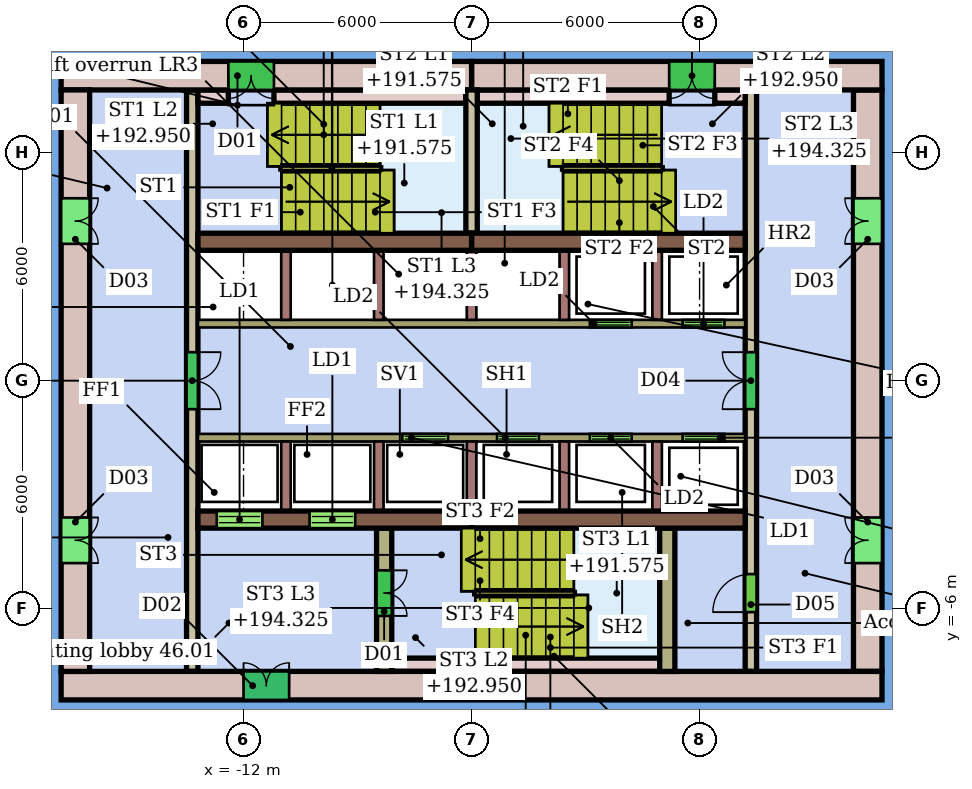
"""IFC4 building model, lengths in metres.
Left out: names, types, materials, properties, quantities, classifications, styles, units other than length and angle.
Written with IfcOpenShell. Run it as: python <this file> out.ifc"""

import sys

from ifc_helpers import new_model, si_unit, direction, frame, frame_2d, origin, place, context, subcontext, project, spatial, rectangle, extrude, element, fill, save


model = new_model("IFC4")
c1 = context("Model", 3, precision=1e-05, world=origin(), true_north=direction((0.0, 1.0)))
c2 = subcontext(c1, "Body", "Model", "MODEL_VIEW")
j1 = project(units=[si_unit("LENGTHUNIT", "METRE"), si_unit("PLANEANGLEUNIT", "RADIAN")], contexts=[c1])
p1 = place(None, origin())
s1 = spatial("IfcSite", under=j1, at=p1, CompositionType="ELEMENT")
p2 = place(p1, origin())
s2 = spatial("IfcBuilding", under=s1, at=p2, CompositionType="ELEMENT")
p3 = place(p2, frame((0.0, 0.0, 190.2)))
s3 = spatial("IfcBuildingStorey", under=s2, at=p3, CompositionType="ELEMENT", Elevation=190.2)
p4 = place(p3, frame((4.8, 8.025, 0.0), z_axis=(0.0, 0.0, 1.0), x_axis=(-1.0, 0.0, 0.0)))
e1 = element("IfcWall", 1, at=p4, inside=s3, PredefinedType="SHEAR", context=c2, shape_type="SweptSolid", body=[
    extrude(rectangle(XDim=10.8, YDim=0.75, at=frame_2d((5.4, 0.0))), origin(), (0.0, 0.0, 1.0), 5.2),
])
p5 = place(p4, frame((4.4, 0.0, 0.0)))
e2 = element("IfcOpeningElement", 2, at=p5, cuts=e1, PredefinedType="OPENING", context=c2, shape_type="SweptSolid", body=[
    extrude(rectangle(XDim=1.2, YDim=2.1, at=frame_2d((0.6, 1.05))), frame((0.0, 0.385, 0.0), z_axis=(0.0, -1.0, 0.0), x_axis=(1.0, 0.0, 0.0)), (0.0, 0.0, 1.0), 0.77),
])
p6 = place(p3, frame((-6.0, 8.025, 0.0), z_axis=(0.0, 0.0, 1.0), x_axis=(-1.0, 0.0, 0.0)))
e3 = element("IfcWall", 3, at=p6, inside=s3, PredefinedType="SHEAR", context=c2, shape_type="SweptSolid", body=[
    extrude(rectangle(XDim=10.8, YDim=0.75, at=frame_2d((5.4, 0.0))), origin(), (0.0, 0.0, 1.0), 5.2),
])
p7 = place(p6, frame((5.2, 0.0, 0.0)))
e4 = element("IfcOpeningElement", 4, at=p7, cuts=e3, PredefinedType="OPENING", context=c2, shape_type="SweptSolid", body=[
    extrude(rectangle(XDim=1.2, YDim=2.1, at=frame_2d((0.6, 1.05))), frame((0.0, 0.385, 0.0), z_axis=(0.0, -1.0, 0.0), x_axis=(1.0, 0.0, 0.0)), (0.0, 0.0, 1.0), 0.77),
])
p8 = place(p3, frame((-16.8, -8.025, 0.0), z_axis=(0.0, 0.0, 1.0), x_axis=(1.0, 0.0, 0.0)))
e5 = element("IfcWall", 5, at=p8, inside=s3, PredefinedType="SHEAR", context=c2, shape_type="SweptSolid", body=[
    extrude(rectangle(XDim=21.6, YDim=0.75, at=frame_2d((10.8, 0.0))), origin(), (0.0, 0.0, 1.0), 5.2),
])
p9 = place(p8, frame((4.8, 0.0, 0.0)))
e6 = element("IfcOpeningElement", 6, at=p9, cuts=e5, PredefinedType="OPENING", context=c2, shape_type="SweptSolid", body=[
    extrude(rectangle(XDim=1.2, YDim=2.1, at=frame_2d((0.6, 1.05))), frame((0.0, 0.385, 0.0), z_axis=(0.0, -1.0, 0.0), x_axis=(1.0, 0.0, 0.0)), (0.0, 0.0, 1.0), 0.77),
])
p10 = place(p3, frame((-16.425, 7.65, 0.0), z_axis=(0.0, 0.0, 1.0), x_axis=(0.0, -1.0, 0.0)))
e7 = element("IfcWall", 7, at=p10, inside=s3, PredefinedType="SHEAR", context=c2, shape_type="SweptSolid", body=[
    extrude(rectangle(XDim=15.3, YDim=0.75, at=frame_2d((7.65, 0.0))), origin(), (0.0, 0.0, 1.0), 5.2),
])
p11 = place(p10, frame((11.25, 0.0, 0.0)))
e8 = element("IfcOpeningElement", 8, at=p11, cuts=e7, PredefinedType="OPENING", context=c2, shape_type="SweptSolid", body=[
    extrude(rectangle(XDim=1.2, YDim=2.1, at=frame_2d((0.6, 1.05))), frame((0.0, 0.385, 0.0), z_axis=(0.0, -1.0, 0.0), x_axis=(1.0, 0.0, 0.0)), (0.0, 0.0, 1.0), 0.77),
])
p12 = place(p10, frame((2.85, 0.0, 0.0)))
e9 = element("IfcOpeningElement", 9, at=p12, cuts=e7, PredefinedType="OPENING", context=c2, shape_type="SweptSolid", body=[
    extrude(rectangle(XDim=1.2, YDim=2.1, at=frame_2d((0.6, 1.05))), frame((0.0, 0.385, 0.0), z_axis=(0.0, -1.0, 0.0), x_axis=(1.0, 0.0, 0.0)), (0.0, 0.0, 1.0), 0.77),
])
p13 = place(p3, frame((4.425, -7.65, 0.0), z_axis=(0.0, 0.0, 1.0), x_axis=(0.0, 1.0, 0.0)))
e10 = element("IfcWall", 10, at=p13, inside=s3, PredefinedType="SHEAR", context=c2, shape_type="SweptSolid", body=[
    extrude(rectangle(XDim=15.3, YDim=0.75, at=frame_2d((7.65, 0.0))), origin(), (0.0, 0.0, 1.0), 5.2),
])
p14 = place(p13, frame((2.85, 0.0, 0.0)))
e11 = element("IfcOpeningElement", 11, at=p14, cuts=e10, PredefinedType="OPENING", context=c2, shape_type="SweptSolid", body=[
    extrude(rectangle(XDim=1.2, YDim=2.1, at=frame_2d((0.6, 1.05))), frame((0.0, 0.385, 0.0), z_axis=(0.0, -1.0, 0.0), x_axis=(1.0, 0.0, 0.0)), (0.0, 0.0, 1.0), 0.77),
])
p15 = place(p13, frame((11.25, 0.0, 0.0)))
e12 = element("IfcOpeningElement", 12, at=p15, cuts=e10, PredefinedType="OPENING", context=c2, shape_type="SweptSolid", body=[
    extrude(rectangle(XDim=1.2, YDim=2.1, at=frame_2d((0.6, 1.05))), frame((0.0, 0.385, 0.0), z_axis=(0.0, -1.0, 0.0), x_axis=(1.0, 0.0, 0.0)), (0.0, 0.0, 1.0), 0.77),
])
for number, where, z_axis, x_axis in (
    (13, (-13.2, 3.655, 0.0), (0.0, 0.0, 1.0), (1.0, 0.0, 0.0)),
    (14, (-6.0, 3.655, 0.0), (0.0, 0.0, 1.0), (1.0, 0.0, 0.0)),
):
    element("IfcWall", number, at=place(p3, frame(where, z_axis=z_axis, x_axis=x_axis)), inside=s3, PredefinedType="SHEAR", context=c2, shape_type="SweptSolid", body=[
        extrude(rectangle(XDim=7.2, YDim=0.45, at=frame_2d((3.6, 0.0))), origin(), (0.0, 0.0, 1.0), 5.2),
    ])
p16 = place(p3, frame((-13.2, -3.655, 0.0), z_axis=(0.0, 0.0, 1.0), x_axis=(1.0, 0.0, 0.0)))
e15 = element("IfcWall", 15, at=p16, inside=s3, PredefinedType="SHEAR", context=c2, shape_type="SweptSolid", body=[
    extrude(rectangle(XDim=7.2, YDim=0.45, at=frame_2d((3.6, 0.0))), origin(), (0.0, 0.0, 1.0), 5.2),
])
p17 = place(p16, frame((0.496, 0.0, 0.0)))
e16 = element("IfcOpeningElement", 16, at=p17, cuts=e15, PredefinedType="OPENING", context=c2, shape_type="SweptSolid", body=[
    extrude(rectangle(XDim=1.2, YDim=2.1, at=frame_2d((0.6, 1.05))), frame((0.0, 0.235, 0.0), z_axis=(0.0, -1.0, 0.0), x_axis=(1.0, 0.0, 0.0)), (0.0, 0.0, 1.0), 0.47),
])
p18 = place(p16, frame((2.938, 0.0, 0.0)))
e17 = element("IfcOpeningElement", 17, at=p18, cuts=e15, PredefinedType="OPENING", context=c2, shape_type="SweptSolid", body=[
    extrude(rectangle(XDim=1.2, YDim=2.1, at=frame_2d((0.6, 1.05))), frame((0.0, 0.235, 0.0), z_axis=(0.0, -1.0, 0.0), x_axis=(1.0, 0.0, 0.0)), (0.0, 0.0, 1.0), 0.47),
])
p19 = place(p3, frame((-6.0, -3.655, 0.0), z_axis=(0.0, 0.0, 1.0), x_axis=(1.0, 0.0, 0.0)))
e18 = element("IfcWall", 18, at=p19, inside=s3, PredefinedType="SHEAR", context=c2, shape_type="SweptSolid", body=[
    extrude(rectangle(XDim=7.2, YDim=0.45, at=frame_2d((3.6, 0.0))), origin(), (0.0, 0.0, 1.0), 5.2),
])
p20 = place(p3, frame((-13.35, 7.65, 0.0), z_axis=(0.0, 0.0, 1.0), x_axis=(0.0, -1.0, 0.0)))
e19 = element("IfcWall", 19, at=p20, inside=s3, PredefinedType="SHEAR", context=c2, shape_type="SweptSolid", body=[
    extrude(rectangle(XDim=15.3, YDim=0.3, at=frame_2d((7.65, 0.0))), origin(), (0.0, 0.0, 1.0), 5.2),
])
p21 = place(p20, frame((6.9, 0.0, 0.0)))
e20 = element("IfcOpeningElement", 20, at=p21, cuts=e19, PredefinedType="OPENING", context=c2, shape_type="SweptSolid", body=[
    extrude(rectangle(XDim=1.5, YDim=2.1, at=frame_2d((0.75, 1.05))), frame((0.0, 0.16, 0.0), z_axis=(0.0, -1.0, 0.0), x_axis=(1.0, 0.0, 0.0)), (0.0, 0.0, 1.0), 0.32),
])
p22 = place(p3, frame((1.35, -7.65, 0.0), z_axis=(0.0, 0.0, 1.0), x_axis=(0.0, 1.0, 0.0)))
e21 = element("IfcWall", 21, at=p22, inside=s3, PredefinedType="SHEAR", context=c2, shape_type="SweptSolid", body=[
    extrude(rectangle(XDim=15.3, YDim=0.3, at=frame_2d((7.65, 0.0))), origin(), (0.0, 0.0, 1.0), 5.2),
])
p23 = place(p22, frame((1.56, 0.0, 0.0)))
e22 = element("IfcOpeningElement", 22, at=p23, cuts=e21, PredefinedType="OPENING", context=c2, shape_type="SweptSolid", body=[
    extrude(rectangle(XDim=1.0, YDim=2.1, at=frame_2d((0.5, 1.05))), frame((0.0, 0.16, 0.0), z_axis=(0.0, -1.0, 0.0), x_axis=(1.0, 0.0, 0.0)), (0.0, 0.0, 1.0), 0.32),
])
p24 = place(p22, frame((6.9, 0.0, 0.0)))
e23 = element("IfcOpeningElement", 23, at=p24, cuts=e21, PredefinedType="OPENING", context=c2, shape_type="SweptSolid", body=[
    extrude(rectangle(XDim=1.5, YDim=2.1, at=frame_2d((0.75, 1.05))), frame((0.0, 0.16, 0.0), z_axis=(0.0, -1.0, 0.0), x_axis=(1.0, 0.0, 0.0)), (0.0, 0.0, 1.0), 0.32),
])
p25 = place(p3, frame((-13.2, 1.5, 0.0), z_axis=(0.0, 0.0, 1.0), x_axis=(1.0, 0.0, 0.0)))
e24 = element("IfcWall", 24, at=p25, inside=s3, PredefinedType="SHEAR", context=c2, shape_type="SweptSolid", body=[
    extrude(rectangle(XDim=14.4, YDim=0.2, at=frame_2d((7.2, 0.0))), origin(), (0.0, 0.0, 1.0), 5.2),
])
p26 = place(p25, frame((10.312, 0.0, 0.0)))
e25 = element("IfcOpeningElement", 25, at=p26, cuts=e24, PredefinedType="OPENING", context=c2, shape_type="SweptSolid", body=[
    extrude(rectangle(XDim=1.1, YDim=2.1, at=frame_2d((0.55, 1.05))), frame((0.0, 0.11, 0.0), z_axis=(0.0, -1.0, 0.0), x_axis=(1.0, 0.0, 0.0)), (0.0, 0.0, 1.0), 0.22),
])
p27 = place(p25, frame((12.754, 0.0, 0.0)))
e26 = element("IfcOpeningElement", 26, at=p27, cuts=e24, PredefinedType="OPENING", context=c2, shape_type="SweptSolid", body=[
    extrude(rectangle(XDim=1.1, YDim=2.1, at=frame_2d((0.55, 1.05))), frame((0.0, 0.11, 0.0), z_axis=(0.0, -1.0, 0.0), x_axis=(1.0, 0.0, 0.0)), (0.0, 0.0, 1.0), 0.22),
])
p28 = place(p3, frame((1.2, -1.5, 0.0), z_axis=(0.0, 0.0, 1.0), x_axis=(-1.0, 0.0, 0.0)))
e27 = element("IfcWall", 27, at=p28, inside=s3, PredefinedType="SHEAR", context=c2, shape_type="SweptSolid", body=[
    extrude(rectangle(XDim=14.4, YDim=0.2, at=frame_2d((7.2, 0.0))), origin(), (0.0, 0.0, 1.0), 5.2),
])
p29 = place(p28, frame((7.821, 0.0, 0.0)))
e28 = element("IfcOpeningElement", 28, at=p29, cuts=e27, PredefinedType="OPENING", context=c2, shape_type="SweptSolid", body=[
    extrude(rectangle(XDim=1.2, YDim=2.1, at=frame_2d((0.6, 1.05))), frame((0.0, 0.11, 0.0), z_axis=(0.0, -1.0, 0.0), x_axis=(1.0, 0.0, 0.0)), (0.0, 0.0, 1.0), 0.22),
])
p30 = place(p28, frame((5.429, 0.0, 0.0)))
e29 = element("IfcOpeningElement", 29, at=p30, cuts=e27, PredefinedType="OPENING", context=c2, shape_type="SweptSolid", body=[
    extrude(rectangle(XDim=1.1, YDim=2.1, at=frame_2d((0.55, 1.05))), frame((0.0, 0.11, 0.0), z_axis=(0.0, -1.0, 0.0), x_axis=(1.0, 0.0, 0.0)), (0.0, 0.0, 1.0), 0.22),
])
p31 = place(p28, frame((2.988, 0.0, 0.0)))
e30 = element("IfcOpeningElement", 30, at=p31, cuts=e27, PredefinedType="OPENING", context=c2, shape_type="SweptSolid", body=[
    extrude(rectangle(XDim=1.1, YDim=2.1, at=frame_2d((0.55, 1.05))), frame((0.0, 0.11, 0.0), z_axis=(0.0, -1.0, 0.0), x_axis=(1.0, 0.0, 0.0)), (0.0, 0.0, 1.0), 0.22),
])
p32 = place(p28, frame((0.546, 0.0, 0.0)))
e31 = element("IfcOpeningElement", 31, at=p32, cuts=e27, PredefinedType="OPENING", context=c2, shape_type="SweptSolid", body=[
    extrude(rectangle(XDim=1.1, YDim=2.1, at=frame_2d((0.55, 1.05))), frame((0.0, 0.11, 0.0), z_axis=(0.0, -1.0, 0.0), x_axis=(1.0, 0.0, 0.0)), (0.0, 0.0, 1.0), 0.22),
])
p33 = place(p3, frame((-8.3, -3.88, 0.0), z_axis=(0.0, 0.0, 1.0), x_axis=(0.0, -1.0, 0.0)))
e32 = element("IfcWall", 32, at=p33, inside=s3, PredefinedType="SHEAR", context=c2, shape_type="SweptSolid", body=[
    extrude(rectangle(XDim=3.77, YDim=0.4, at=frame_2d((1.885, 0.0))), origin(), (0.0, 0.0, 1.0), 5.2),
])
p34 = place(p33, frame((1.11, 0.0, 0.0)))
e33 = element("IfcOpeningElement", 33, at=p34, cuts=e32, PredefinedType="OPENING", context=c2, shape_type="SweptSolid", body=[
    extrude(rectangle(XDim=1.2, YDim=2.1, at=frame_2d((0.6, 1.05))), frame((0.0, 0.21, 0.0), z_axis=(0.0, -1.0, 0.0), x_axis=(1.0, 0.0, 0.0)), (0.0, 0.0, 1.0), 0.42),
])
p35 = place(p3, frame((-0.85, -3.88, 0.0), z_axis=(0.0, 0.0, 1.0), x_axis=(0.0, -1.0, 0.0)))
e34 = element("IfcWall", 34, at=p35, inside=s3, PredefinedType="SHEAR", context=c2, shape_type="SweptSolid", body=[
    extrude(rectangle(XDim=3.77, YDim=0.4, at=frame_2d((1.885, 0.0))), origin(), (0.0, 0.0, 1.0), 5.2),
])
p36 = place(p3, frame((-6.0, 3.88, 0.0), z_axis=(0.0, 0.0, 1.0), x_axis=(0.0, 1.0, 0.0)))
e35 = element("IfcWall", 35, at=p36, inside=s3, PredefinedType="SHEAR", context=c2, shape_type="SweptSolid", body=[
    extrude(rectangle(XDim=3.77, YDim=0.3, at=frame_2d((1.885, 0.0))), origin(), (0.0, 0.0, 1.0), 5.2),
])
p37 = place(p3, frame((-13.2, 7.475, 0.0), z_axis=(0.0, 0.0, 1.0), x_axis=(1.0, 0.0, 0.0)))
e36 = element("IfcWall", 36, at=p37, inside=s3, PredefinedType="SHEAR", context=c2, shape_type="SweptSolid", body=[
    extrude(rectangle(XDim=0.8, YDim=0.35, at=frame_2d((0.4, 0.0))), origin(), (0.0, 0.0, 1.0), 5.2),
])
for number, where, z_axis, x_axis in (
    (37, (-11.2, 7.475, 0.0), (0.0, 0.0, 1.0), (1.0, 0.0, 0.0)),
    (38, (-5.85, 7.475, 0.0), (0.0, 0.0, 1.0), (1.0, 0.0, 0.0)),
):
    element("IfcWall", number, at=place(p3, frame(where, z_axis=z_axis, x_axis=x_axis)), inside=s3, PredefinedType="SHEAR", context=c2, shape_type="SweptSolid", body=[
        extrude(rectangle(XDim=5.05, YDim=0.35, at=frame_2d((2.525, 0.0))), origin(), (0.0, 0.0, 1.0), 5.2),
    ])
p38 = place(p3, frame((0.4, 7.475, 0.0), z_axis=(0.0, 0.0, 1.0), x_axis=(1.0, 0.0, 0.0)))
e39 = element("IfcWall", 39, at=p38, inside=s3, PredefinedType="SHEAR", context=c2, shape_type="SweptSolid", body=[
    extrude(rectangle(XDim=0.8, YDim=0.35, at=frame_2d((0.4, 0.0))), origin(), (0.0, 0.0, 1.0), 5.2),
])
p39 = place(p3, frame((-8.1, -7.475, 0.0), z_axis=(0.0, 0.0, 1.0), x_axis=(1.0, 0.0, 0.0)))
e40 = element("IfcWall", 40, at=p39, inside=s3, PredefinedType="SHEAR", context=c2, shape_type="SweptSolid", body=[
    extrude(rectangle(XDim=7.05, YDim=0.35, at=frame_2d((3.525, 0.0))), origin(), (0.0, 0.0, 1.0), 5.2),
])
for number, where, z_axis, x_axis in (
    (41, (-10.883, 1.6, 0.0), (0.0, 0.0, 1.0), (0.0, 1.0, 0.0)),
    (42, (-8.442, 1.6, 0.0), (0.0, 0.0, 1.0), (0.0, 1.0, 0.0)),
    (43, (-6.0, 1.6, 0.0), (0.0, 0.0, 1.0), (0.0, 1.0, 0.0)),
    (44, (-3.558, 1.6, 0.0), (0.0, 0.0, 1.0), (0.0, 1.0, 0.0)),
    (45, (-1.117, 1.6, 0.0), (0.0, 0.0, 1.0), (0.0, 1.0, 0.0)),
    (46, (-10.883, -1.6, 0.0), (0.0, 0.0, 1.0), (0.0, -1.0, 0.0)),
    (47, (-8.442, -1.6, 0.0), (0.0, 0.0, 1.0), (0.0, -1.0, 0.0)),
    (48, (-6.0, -1.6, 0.0), (0.0, 0.0, 1.0), (0.0, -1.0, 0.0)),
    (49, (-3.558, -1.6, 0.0), (0.0, 0.0, 1.0), (0.0, -1.0, 0.0)),
    (50, (-1.117, -1.6, 0.0), (0.0, 0.0, 1.0), (0.0, -1.0, 0.0)),
):
    element("IfcWall", number, at=place(p3, frame(where, z_axis=z_axis, x_axis=x_axis)), inside=s3, PredefinedType="SHEAR", context=c2, shape_type="SweptSolid", body=[
        extrude(rectangle(XDim=1.83, YDim=0.25, at=frame_2d((0.915, 0.0))), origin(), (0.0, 0.0, 1.0), 5.2),
    ])
p40 = place(p5, origin())
e51 = element("IfcDoor", 51, at=p40, inside=s3, OperationType="DOUBLE_DOOR_SINGLE_SWING", PredefinedType="NOTDEFINED", context=c2, shape_type="SweptSolid", body=[
    extrude(rectangle(XDim=1.2, YDim=2.1, at=frame_2d((0.6, 1.05))), frame((0.0, 0.025, 0.0), z_axis=(0.0, -1.0, 0.0), x_axis=(1.0, 0.0, 0.0)), (0.0, 0.0, 1.0), 0.05),
])
fill(e2, e51)
p41 = place(p7, origin())
e52 = element("IfcDoor", 52, at=p41, inside=s3, OperationType="DOUBLE_DOOR_SINGLE_SWING", PredefinedType="NOTDEFINED", context=c2, shape_type="SweptSolid", body=[
    extrude(rectangle(XDim=1.2, YDim=2.1, at=frame_2d((0.6, 1.05))), frame((0.0, 0.025, 0.0), z_axis=(0.0, -1.0, 0.0), x_axis=(1.0, 0.0, 0.0)), (0.0, 0.0, 1.0), 0.05),
])
fill(e4, e52)
p42 = place(p9, origin())
e53 = element("IfcDoor", 53, at=p42, inside=s3, OperationType="DOUBLE_DOOR_SINGLE_SWING", PredefinedType="NOTDEFINED", context=c2, shape_type="SweptSolid", body=[
    extrude(rectangle(XDim=1.2, YDim=2.1, at=frame_2d((0.6, 1.05))), frame((0.0, 0.025, 0.0), z_axis=(0.0, -1.0, 0.0), x_axis=(1.0, 0.0, 0.0)), (0.0, 0.0, 1.0), 0.05),
])
fill(e6, e53)
p43 = place(p11, origin())
e54 = element("IfcDoor", 54, at=p43, inside=s3, OperationType="DOUBLE_DOOR_SINGLE_SWING", PredefinedType="NOTDEFINED", context=c2, shape_type="SweptSolid", body=[
    extrude(rectangle(XDim=1.2, YDim=2.1, at=frame_2d((0.6, 1.05))), frame((0.0, 0.025, 0.0), z_axis=(0.0, -1.0, 0.0), x_axis=(1.0, 0.0, 0.0)), (0.0, 0.0, 1.0), 0.05),
])
fill(e8, e54)
p44 = place(p12, origin())
e55 = element("IfcDoor", 55, at=p44, inside=s3, OperationType="DOUBLE_DOOR_SINGLE_SWING", PredefinedType="NOTDEFINED", context=c2, shape_type="SweptSolid", body=[
    extrude(rectangle(XDim=1.2, YDim=2.1, at=frame_2d((0.6, 1.05))), frame((0.0, 0.025, 0.0), z_axis=(0.0, -1.0, 0.0), x_axis=(1.0, 0.0, 0.0)), (0.0, 0.0, 1.0), 0.05),
])
fill(e9, e55)
p45 = place(p14, origin())
e56 = element("IfcDoor", 56, at=p45, inside=s3, OperationType="DOUBLE_DOOR_SINGLE_SWING", PredefinedType="NOTDEFINED", context=c2, shape_type="SweptSolid", body=[
    extrude(rectangle(XDim=1.2, YDim=2.1, at=frame_2d((0.6, 1.05))), frame((0.0, 0.025, 0.0), z_axis=(0.0, -1.0, 0.0), x_axis=(1.0, 0.0, 0.0)), (0.0, 0.0, 1.0), 0.05),
])
fill(e11, e56)
p46 = place(p15, origin())
e57 = element("IfcDoor", 57, at=p46, inside=s3, OperationType="DOUBLE_DOOR_SINGLE_SWING", PredefinedType="NOTDEFINED", context=c2, shape_type="SweptSolid", body=[
    extrude(rectangle(XDim=1.2, YDim=2.1, at=frame_2d((0.6, 1.05))), frame((0.0, 0.025, 0.0), z_axis=(0.0, -1.0, 0.0), x_axis=(1.0, 0.0, 0.0)), (0.0, 0.0, 1.0), 0.05),
])
fill(e12, e57)
p47 = place(p17, origin())
e58 = element("IfcDoor", 58, at=p47, inside=s3, OperationType="DOUBLE_DOOR_SLIDING", PredefinedType="NOTDEFINED", context=c2, shape_type="SweptSolid", body=[
    extrude(rectangle(XDim=1.2, YDim=2.1, at=frame_2d((0.6, 1.05))), frame((0.0, 0.025, 0.0), z_axis=(0.0, -1.0, 0.0), x_axis=(1.0, 0.0, 0.0)), (0.0, 0.0, 1.0), 0.05),
])
fill(e16, e58)
p48 = place(p18, origin())
e59 = element("IfcDoor", 59, at=p48, inside=s3, OperationType="DOUBLE_DOOR_SLIDING", PredefinedType="NOTDEFINED", context=c2, shape_type="SweptSolid", body=[
    extrude(rectangle(XDim=1.2, YDim=2.1, at=frame_2d((0.6, 1.05))), frame((0.0, 0.025, 0.0), z_axis=(0.0, -1.0, 0.0), x_axis=(1.0, 0.0, 0.0)), (0.0, 0.0, 1.0), 0.05),
])
fill(e17, e59)
p49 = place(p21, origin())
e60 = element("IfcDoor", 60, at=p49, inside=s3, OperationType="DOUBLE_DOOR_SINGLE_SWING", PredefinedType="NOTDEFINED", context=c2, shape_type="SweptSolid", body=[
    extrude(rectangle(XDim=1.5, YDim=2.1, at=frame_2d((0.75, 1.05))), frame((0.0, 0.025, 0.0), z_axis=(0.0, -1.0, 0.0), x_axis=(1.0, 0.0, 0.0)), (0.0, 0.0, 1.0), 0.05),
])
fill(e20, e60)
p50 = place(p23, origin())
e61 = element("IfcDoor", 61, at=p50, inside=s3, OperationType="SINGLE_SWING_LEFT", PredefinedType="NOTDEFINED", context=c2, shape_type="SweptSolid", body=[
    extrude(rectangle(XDim=1.0, YDim=2.1, at=frame_2d((0.5, 1.05))), frame((0.0, 0.025, 0.0), z_axis=(0.0, -1.0, 0.0), x_axis=(1.0, 0.0, 0.0)), (0.0, 0.0, 1.0), 0.05),
])
fill(e22, e61)
p51 = place(p24, origin())
e62 = element("IfcDoor", 62, at=p51, inside=s3, OperationType="DOUBLE_DOOR_SINGLE_SWING", PredefinedType="NOTDEFINED", context=c2, shape_type="SweptSolid", body=[
    extrude(rectangle(XDim=1.5, YDim=2.1, at=frame_2d((0.75, 1.05))), frame((0.0, 0.025, 0.0), z_axis=(0.0, -1.0, 0.0), x_axis=(1.0, 0.0, 0.0)), (0.0, 0.0, 1.0), 0.05),
])
fill(e23, e62)
p52 = place(p26, origin())
e63 = element("IfcDoor", 63, at=p52, inside=s3, OperationType="DOUBLE_DOOR_SLIDING", PredefinedType="NOTDEFINED", context=c2, shape_type="SweptSolid", body=[
    extrude(rectangle(XDim=1.1, YDim=2.1, at=frame_2d((0.55, 1.05))), frame((0.0, 0.025, 0.0), z_axis=(0.0, -1.0, 0.0), x_axis=(1.0, 0.0, 0.0)), (0.0, 0.0, 1.0), 0.05),
])
fill(e25, e63)
p53 = place(p27, origin())
e64 = element("IfcDoor", 64, at=p53, inside=s3, OperationType="DOUBLE_DOOR_SLIDING", PredefinedType="NOTDEFINED", context=c2, shape_type="SweptSolid", body=[
    extrude(rectangle(XDim=1.1, YDim=2.1, at=frame_2d((0.55, 1.05))), frame((0.0, 0.025, 0.0), z_axis=(0.0, -1.0, 0.0), x_axis=(1.0, 0.0, 0.0)), (0.0, 0.0, 1.0), 0.05),
])
fill(e26, e64)
p54 = place(p29, origin())
e65 = element("IfcDoor", 65, at=p54, inside=s3, OperationType="DOUBLE_DOOR_SLIDING", PredefinedType="NOTDEFINED", context=c2, shape_type="SweptSolid", body=[
    extrude(rectangle(XDim=1.2, YDim=2.1, at=frame_2d((0.6, 1.05))), frame((0.0, 0.025, 0.0), z_axis=(0.0, -1.0, 0.0), x_axis=(1.0, 0.0, 0.0)), (0.0, 0.0, 1.0), 0.05),
])
fill(e28, e65)
p55 = place(p30, origin())
e66 = element("IfcDoor", 66, at=p55, inside=s3, OperationType="DOUBLE_DOOR_SLIDING", PredefinedType="NOTDEFINED", context=c2, shape_type="SweptSolid", body=[
    extrude(rectangle(XDim=1.1, YDim=2.1, at=frame_2d((0.55, 1.05))), frame((0.0, 0.025, 0.0), z_axis=(0.0, -1.0, 0.0), x_axis=(1.0, 0.0, 0.0)), (0.0, 0.0, 1.0), 0.05),
])
fill(e29, e66)
p56 = place(p31, origin())
e67 = element("IfcDoor", 67, at=p56, inside=s3, OperationType="DOUBLE_DOOR_SLIDING", PredefinedType="NOTDEFINED", context=c2, shape_type="SweptSolid", body=[
    extrude(rectangle(XDim=1.1, YDim=2.1, at=frame_2d((0.55, 1.05))), frame((0.0, 0.025, 0.0), z_axis=(0.0, -1.0, 0.0), x_axis=(1.0, 0.0, 0.0)), (0.0, 0.0, 1.0), 0.05),
])
fill(e30, e67)
p57 = place(p32, origin())
e68 = element("IfcDoor", 68, at=p57, inside=s3, OperationType="DOUBLE_DOOR_SLIDING", PredefinedType="NOTDEFINED", context=c2, shape_type="SweptSolid", body=[
    extrude(rectangle(XDim=1.1, YDim=2.1, at=frame_2d((0.55, 1.05))), frame((0.0, 0.025, 0.0), z_axis=(0.0, -1.0, 0.0), x_axis=(1.0, 0.0, 0.0)), (0.0, 0.0, 1.0), 0.05),
])
fill(e31, e68)
p58 = place(p34, origin())
e69 = element("IfcDoor", 69, at=p58, inside=s3, OperationType="DOUBLE_DOOR_SINGLE_SWING", PredefinedType="NOTDEFINED", context=c2, shape_type="SweptSolid", body=[
    extrude(rectangle(XDim=1.2, YDim=2.1, at=frame_2d((0.6, 1.05))), frame((0.0, 0.025, 0.0), z_axis=(0.0, -1.0, 0.0), x_axis=(1.0, 0.0, 0.0)), (0.0, 0.0, 1.0), 0.05),
])
fill(e33, e69)
save(model, sys.argv[1])
